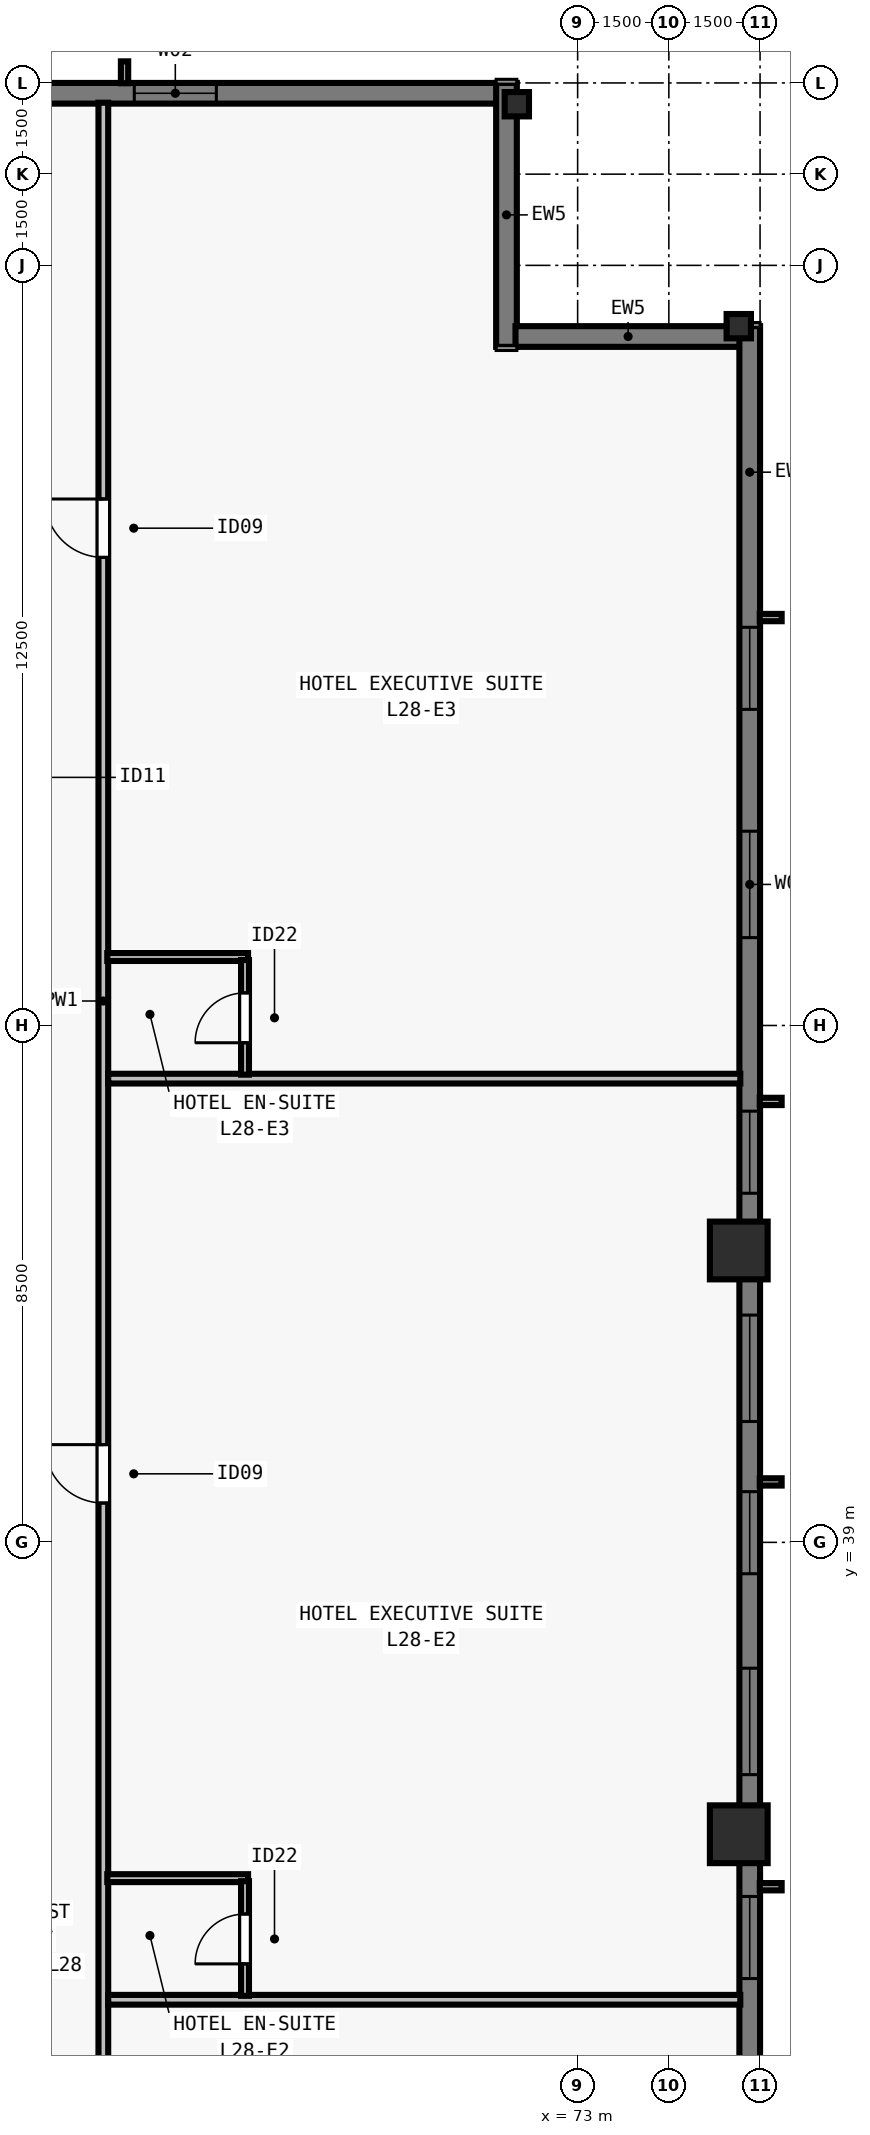
"""IFC4 building model, lengths in metres.
Left out: names, types, materials, properties, quantities, classifications, styles, units other than length and angle.
Written with IfcOpenShell. Run it as: python <this file> out.ifc"""

import sys

from ifc_helpers import new_model, si_unit, direction, frame, frame_2d, origin, origin_2d, place, context, subcontext, project, spatial, rectangle, i_section, extrude, element, fill, save


model = new_model("IFC4")
c1 = context("Model", 3, precision=1e-05, world=origin(), true_north=direction((0.0, 1.0)))
c2 = subcontext(c1, "Body", "Model", "MODEL_VIEW")
j1 = project(units=[si_unit("LENGTHUNIT", "METRE"), si_unit("PLANEANGLEUNIT", "RADIAN")], contexts=[c1])
p1 = place(None, origin())
s1 = spatial("IfcSite", under=j1, at=p1, CompositionType="ELEMENT")
p2 = place(p1, origin())
s2 = spatial("IfcBuilding", under=s1, at=p2, CompositionType="ELEMENT")
p3 = place(p2, frame((0.0, 0.0, 106.0)))
s3 = spatial("IfcBuildingStorey", under=s2, at=p3, CompositionType="ELEMENT", Elevation=106.0)
for number, where, z_axis, x_axis in (
    (1, (75.65, 34.2, 0.0), (0.0, 0.0, 1.0), (0.0, 1.0, 0.0)),
    (2, (75.65, 43.8, 0.0), (0.0, 0.0, 1.0), (0.0, 1.0, 0.0)),
):
    element("IfcColumn", number, at=place(p3, frame(where, z_axis=z_axis, x_axis=x_axis)), inside=s3, PredefinedType="COLUMN", context=c2, shape_type="SweptSolid", body=[
        extrude(rectangle(XDim=0.95, YDim=0.95, at=origin_2d()), origin(), (0.0, 0.0, 1.0), 3.5),
    ])
for number, where, z_axis, x_axis in (
    (3, (75.65, 59.0, 0.0), (0.0, 0.0, 1.0), (0.0, 1.0, 0.0)),
    (4, (72.0, 62.65, 0.0), (0.0, 0.0, 1.0), (1.0, 0.0, 0.0)),
):
    element("IfcColumn", number, at=place(p3, frame(where, z_axis=z_axis, x_axis=x_axis)), inside=s3, PredefinedType="COLUMN", context=c2, shape_type="SweptSolid", body=[
        extrude(i_section(OverallWidth=0.4, OverallDepth=0.4, WebThickness=0.022, FlangeThickness=0.036, at=origin_2d()), origin(), (0.0, 0.0, 1.0), 3.5),
    ])
p4 = place(p3, frame((45.0, 62.83, 0.0), z_axis=(0.0, 0.0, 1.0), x_axis=(1.0, 0.0, 0.0)))
e5 = element("IfcWall", 5, at=p4, inside=s3, PredefinedType="SOLIDWALL", context=c2, shape_type="SweptSolid", body=[
    extrude(rectangle(XDim=26.682, YDim=0.34, at=frame_2d((13.341, 0.0))), origin(), (0.0, 0.0, 1.0), 3.28),
])
p5 = place(p4, frame((5.073, 0.0, 0.8)))
e6 = element("IfcOpeningElement", 6, at=p5, cuts=e5, PredefinedType="OPENING", context=c2, shape_type="SweptSolid", body=[
    extrude(rectangle(XDim=1.35, YDim=1.66, at=frame_2d((0.675, 0.83))), frame((0.0, 0.18, 0.0), z_axis=(0.0, -1.0, 0.0), x_axis=(1.0, 0.0, 0.0)), (0.0, 0.0, 1.0), 0.36),
])
p6 = place(p4, frame((8.219, 0.0, 0.8)))
e7 = element("IfcOpeningElement", 7, at=p6, cuts=e5, PredefinedType="OPENING", context=c2, shape_type="SweptSolid", body=[
    extrude(rectangle(XDim=1.75, YDim=1.66, at=frame_2d((0.875, 0.83))), frame((0.0, 0.18, 0.0), z_axis=(0.0, -1.0, 0.0), x_axis=(1.0, 0.0, 0.0)), (0.0, 0.0, 1.0), 0.36),
])
p7 = place(p4, frame((12.666, 0.0, 0.8)))
e8 = element("IfcOpeningElement", 8, at=p7, cuts=e5, PredefinedType="OPENING", context=c2, shape_type="SweptSolid", body=[
    extrude(rectangle(XDim=1.35, YDim=1.66, at=frame_2d((0.675, 0.83))), frame((0.0, 0.18, 0.0), z_axis=(0.0, -1.0, 0.0), x_axis=(1.0, 0.0, 0.0)), (0.0, 0.0, 1.0), 0.36),
])
p8 = place(p4, frame((15.812, 0.0, 0.8)))
e9 = element("IfcOpeningElement", 9, at=p8, cuts=e5, PredefinedType="OPENING", context=c2, shape_type="SweptSolid", body=[
    extrude(rectangle(XDim=1.75, YDim=1.66, at=frame_2d((0.875, 0.83))), frame((0.0, 0.18, 0.0), z_axis=(0.0, -1.0, 0.0), x_axis=(1.0, 0.0, 0.0)), (0.0, 0.0, 1.0), 0.36),
])
p9 = place(p4, frame((20.709, 0.0, 0.8)))
e10 = element("IfcOpeningElement", 10, at=p9, cuts=e5, PredefinedType="OPENING", context=c2, shape_type="SweptSolid", body=[
    extrude(rectangle(XDim=1.35, YDim=1.66, at=frame_2d((0.675, 0.83))), frame((0.0, 0.18, 0.0), z_axis=(0.0, -1.0, 0.0), x_axis=(1.0, 0.0, 0.0)), (0.0, 0.0, 1.0), 0.36),
])
p10 = place(p3, frame((71.83, 63.0, 0.0), z_axis=(0.0, 0.0, 1.0), x_axis=(0.0, -1.0, 0.0)))
e11 = element("IfcWall", 11, at=p10, inside=s3, PredefinedType="SOLIDWALL", context=c2, shape_type="SweptSolid", body=[
    extrude(rectangle(XDim=4.34, YDim=0.34, at=frame_2d((2.17, 0.0))), origin(), (0.0, 0.0, 1.0), 3.28),
])
p11 = place(p3, frame((71.978, 58.83, 0.0), z_axis=(0.0, 0.0, 1.0), x_axis=(1.0, 0.0, 0.0)))
e12 = element("IfcWall", 12, at=p11, inside=s3, PredefinedType="SOLIDWALL", context=c2, shape_type="SweptSolid", body=[
    extrude(rectangle(XDim=3.704, YDim=0.34, at=frame_2d((1.852, 0.0))), origin(), (0.0, 0.0, 1.0), 3.28),
])
p12 = place(p3, frame((75.83, 59.0, 0.0), z_axis=(0.0, 0.0, 1.0), x_axis=(0.0, -1.0, 0.0)))
e13 = element("IfcWall", 13, at=p12, inside=s3, PredefinedType="SOLIDWALL", context=c2, shape_type="SweptSolid", body=[
    extrude(rectangle(XDim=39.682, YDim=0.34, at=frame_2d((19.841, 0.0))), origin(), (0.0, 0.0, 1.0), 3.28),
])
p13 = place(p12, frame((4.952, 0.0, 0.8)))
e14 = element("IfcOpeningElement", 14, at=p13, cuts=e13, PredefinedType="OPENING", context=c2, shape_type="SweptSolid", body=[
    extrude(rectangle(XDim=1.35, YDim=1.66, at=frame_2d((0.675, 0.83))), frame((0.0, 0.18, 0.0), z_axis=(0.0, -1.0, 0.0), x_axis=(1.0, 0.0, 0.0)), (0.0, 0.0, 1.0), 0.36),
])
p14 = place(p12, frame((8.305, 0.0, 0.8)))
e15 = element("IfcOpeningElement", 15, at=p14, cuts=e13, PredefinedType="OPENING", context=c2, shape_type="SweptSolid", body=[
    extrude(rectangle(XDim=1.75, YDim=1.66, at=frame_2d((0.875, 0.83))), frame((0.0, 0.18, 0.0), z_axis=(0.0, -1.0, 0.0), x_axis=(1.0, 0.0, 0.0)), (0.0, 0.0, 1.0), 0.36),
])
p15 = place(p12, frame((12.909, 0.0, 0.8)))
e16 = element("IfcOpeningElement", 16, at=p15, cuts=e13, PredefinedType="OPENING", context=c2, shape_type="SweptSolid", body=[
    extrude(rectangle(XDim=1.35, YDim=1.66, at=frame_2d((0.675, 0.83))), frame((0.0, 0.18, 0.0), z_axis=(0.0, -1.0, 0.0), x_axis=(1.0, 0.0, 0.0)), (0.0, 0.0, 1.0), 0.36),
])
p16 = place(p12, frame((16.262, 0.0, 0.8)))
e17 = element("IfcOpeningElement", 17, at=p16, cuts=e13, PredefinedType="OPENING", context=c2, shape_type="SweptSolid", body=[
    extrude(rectangle(XDim=1.75, YDim=1.66, at=frame_2d((0.875, 0.83))), frame((0.0, 0.18, 0.0), z_axis=(0.0, -1.0, 0.0), x_axis=(1.0, 0.0, 0.0)), (0.0, 0.0, 1.0), 0.36),
])
p17 = place(p12, frame((19.166, 0.0, 0.8)))
e18 = element("IfcOpeningElement", 18, at=p17, cuts=e13, PredefinedType="OPENING", context=c2, shape_type="SweptSolid", body=[
    extrude(rectangle(XDim=1.35, YDim=1.66, at=frame_2d((0.675, 0.83))), frame((0.0, 0.18, 0.0), z_axis=(0.0, -1.0, 0.0), x_axis=(1.0, 0.0, 0.0)), (0.0, 0.0, 1.0), 0.36),
])
p18 = place(p12, frame((22.07, 0.0, 0.8)))
e19 = element("IfcOpeningElement", 19, at=p18, cuts=e13, PredefinedType="OPENING", context=c2, shape_type="SweptSolid", body=[
    extrude(rectangle(XDim=1.75, YDim=1.66, at=frame_2d((0.875, 0.83))), frame((0.0, 0.18, 0.0), z_axis=(0.0, -1.0, 0.0), x_axis=(1.0, 0.0, 0.0)), (0.0, 0.0, 1.0), 0.36),
])
p19 = place(p12, frame((25.823, 0.0, 0.8)))
e20 = element("IfcOpeningElement", 20, at=p19, cuts=e13, PredefinedType="OPENING", context=c2, shape_type="SweptSolid", body=[
    extrude(rectangle(XDim=1.35, YDim=1.66, at=frame_2d((0.675, 0.83))), frame((0.0, 0.18, 0.0), z_axis=(0.0, -1.0, 0.0), x_axis=(1.0, 0.0, 0.0)), (0.0, 0.0, 1.0), 0.36),
])
p20 = place(p12, frame((29.627, 0.0, 0.8)))
e21 = element("IfcOpeningElement", 21, at=p20, cuts=e13, PredefinedType="OPENING", context=c2, shape_type="SweptSolid", body=[
    extrude(rectangle(XDim=1.75, YDim=1.66, at=frame_2d((0.875, 0.83))), frame((0.0, 0.18, 0.0), z_axis=(0.0, -1.0, 0.0), x_axis=(1.0, 0.0, 0.0)), (0.0, 0.0, 1.0), 0.36),
])
p21 = place(p12, frame((33.38, 0.0, 0.8)))
e22 = element("IfcOpeningElement", 22, at=p21, cuts=e13, PredefinedType="OPENING", context=c2, shape_type="SweptSolid", body=[
    extrude(rectangle(XDim=1.35, YDim=1.66, at=frame_2d((0.675, 0.83))), frame((0.0, 0.18, 0.0), z_axis=(0.0, -1.0, 0.0), x_axis=(1.0, 0.0, 0.0)), (0.0, 0.0, 1.0), 0.36),
])
p22 = place(p3, frame((65.2, 15.325, 0.0), z_axis=(0.0, 0.0, 1.0), x_axis=(0.0, 1.0, 0.0)))
e23 = element("IfcWall", 23, at=p22, inside=s3, PredefinedType="PARTITIONING", context=c2, shape_type="SweptSolid", body=[
    extrude(rectangle(XDim=47.35, YDim=0.16, at=frame_2d((23.675, 0.0))), origin(), (0.0, 0.0, 1.0), 2.555),
])
p23 = place(p22, frame((8.944, 0.0, 0.0)))
e24 = element("IfcOpeningElement", 24, at=p23, cuts=e23, PredefinedType="OPENING", context=c2, shape_type="SweptSolid", body=[
    extrude(rectangle(XDim=0.96, YDim=2.15, at=frame_2d((0.48, 1.075))), frame((0.0, 0.09, 0.0), z_axis=(0.0, -1.0, 0.0), x_axis=(1.0, 0.0, 0.0)), (0.0, 0.0, 1.0), 0.18),
])
p24 = place(p22, frame((24.322, 0.0, 0.0)))
e25 = element("IfcOpeningElement", 25, at=p24, cuts=e23, PredefinedType="OPENING", context=c2, shape_type="SweptSolid", body=[
    extrude(rectangle(XDim=0.96, YDim=2.15, at=frame_2d((0.48, 1.075))), frame((0.0, 0.09, 0.0), z_axis=(0.0, -1.0, 0.0), x_axis=(1.0, 0.0, 0.0)), (0.0, 0.0, 1.0), 0.18),
])
p25 = place(p22, frame((39.873, 0.0, 0.0)))
e26 = element("IfcOpeningElement", 26, at=p25, cuts=e23, PredefinedType="OPENING", context=c2, shape_type="SweptSolid", body=[
    extrude(rectangle(XDim=0.96, YDim=2.15, at=frame_2d((0.48, 1.075))), frame((0.0, 0.09, 0.0), z_axis=(0.0, -1.0, 0.0), x_axis=(1.0, 0.0, 0.0)), (0.0, 0.0, 1.0), 0.18),
])
p26 = place(p3, frame((65.28, 31.478, 0.0), z_axis=(0.0, 0.0, 1.0), x_axis=(1.0, 0.0, 0.0)))
e27 = element("IfcWall", 27, at=p26, inside=s3, PredefinedType="PARTITIONING", context=c2, shape_type="SweptSolid", body=[
    extrude(rectangle(XDim=10.395, YDim=0.16, at=frame_2d((5.198, 0.0))), origin(), (0.0, 0.0, 1.0), 3.28),
])
p27 = place(p3, frame((65.265, 33.478, 0.0), z_axis=(0.0, 0.0, 1.0), x_axis=(1.0, 0.0, 0.0)))
e28 = element("IfcWall", 28, at=p27, inside=s3, PredefinedType="PLUMBINGWALL", context=c2, shape_type="SweptSolid", body=[
    extrude(rectangle(XDim=2.315, YDim=0.13, at=frame_2d((1.158, 0.0))), origin(), (0.0, 0.0, 1.0), 3.28),
])
p28 = place(p3, frame((67.53, 31.543, 0.0), z_axis=(0.0, 0.0, 1.0), x_axis=(0.0, 1.0, 0.0)))
e29 = element("IfcWall", 29, at=p28, inside=s3, PredefinedType="PLUMBINGWALL", context=c2, shape_type="SweptSolid", body=[
    extrude(rectangle(XDim=1.885, YDim=0.13, at=frame_2d((0.942, 0.0))), origin(), (0.0, 0.0, 1.0), 3.28),
])
p29 = place(p28, frame((0.525, 0.0, 0.0)))
e30 = element("IfcOpeningElement", 30, at=p29, cuts=e29, PredefinedType="OPENING", context=c2, shape_type="SweptSolid", body=[
    extrude(rectangle(XDim=0.82, YDim=2.1, at=frame_2d((0.41, 1.05))), frame((0.0, 0.075, 0.0), z_axis=(0.0, -1.0, 0.0), x_axis=(1.0, 0.0, 0.0)), (0.0, 0.0, 1.0), 0.15),
])
p30 = place(p3, frame((65.28, 46.626, 0.0), z_axis=(0.0, 0.0, 1.0), x_axis=(1.0, 0.0, 0.0)))
e31 = element("IfcWall", 31, at=p30, inside=s3, PredefinedType="PARTITIONING", context=c2, shape_type="SweptSolid", body=[
    extrude(rectangle(XDim=10.395, YDim=0.16, at=frame_2d((5.198, 0.0))), origin(), (0.0, 0.0, 1.0), 3.28),
])
p31 = place(p3, frame((65.265, 48.626, 0.0), z_axis=(0.0, 0.0, 1.0), x_axis=(1.0, 0.0, 0.0)))
e32 = element("IfcWall", 32, at=p31, inside=s3, PredefinedType="PLUMBINGWALL", context=c2, shape_type="SweptSolid", body=[
    extrude(rectangle(XDim=2.315, YDim=0.13, at=frame_2d((1.158, 0.0))), origin(), (0.0, 0.0, 1.0), 3.28),
])
p32 = place(p3, frame((67.53, 46.691, 0.0), z_axis=(0.0, 0.0, 1.0), x_axis=(0.0, 1.0, 0.0)))
e33 = element("IfcWall", 33, at=p32, inside=s3, PredefinedType="PLUMBINGWALL", context=c2, shape_type="SweptSolid", body=[
    extrude(rectangle(XDim=1.885, YDim=0.13, at=frame_2d((0.942, 0.0))), origin(), (0.0, 0.0, 1.0), 3.28),
])
p33 = place(p32, frame((0.525, 0.0, 0.0)))
e34 = element("IfcOpeningElement", 34, at=p33, cuts=e33, PredefinedType="OPENING", context=c2, shape_type="SweptSolid", body=[
    extrude(rectangle(XDim=0.82, YDim=2.1, at=frame_2d((0.41, 1.05))), frame((0.0, 0.075, 0.0), z_axis=(0.0, -1.0, 0.0), x_axis=(1.0, 0.0, 0.0)), (0.0, 0.0, 1.0), 0.15),
])
p34 = place(p9, origin())
e35 = element("IfcWindow", 35, at=p34, inside=s3, PartitioningType="SINGLE_PANEL", PredefinedType="WINDOW", context=c2, shape_type="SweptSolid", body=[
    extrude(rectangle(XDim=1.35, YDim=1.66, at=frame_2d((0.675, 0.83))), frame((0.0, -0.05, 0.0), z_axis=(0.0, -1.0, 0.0), x_axis=(1.0, 0.0, 0.0)), (0.0, 0.0, 1.0), 0.06),
])
fill(e10, e35)
p35 = place(p13, origin())
e36 = element("IfcWindow", 36, at=p35, inside=s3, PartitioningType="SINGLE_PANEL", PredefinedType="WINDOW", context=c2, shape_type="SweptSolid", body=[
    extrude(rectangle(XDim=1.35, YDim=1.66, at=frame_2d((0.675, 0.83))), frame((0.0, -0.05, 0.0), z_axis=(0.0, -1.0, 0.0), x_axis=(1.0, 0.0, 0.0)), (0.0, 0.0, 1.0), 0.06),
])
fill(e14, e36)
p36 = place(p14, origin())
e37 = element("IfcWindow", 37, at=p36, inside=s3, PartitioningType="SINGLE_PANEL", PredefinedType="WINDOW", context=c2, shape_type="SweptSolid", body=[
    extrude(rectangle(XDim=1.75, YDim=1.66, at=frame_2d((0.875, 0.83))), frame((0.0, -0.05, 0.0), z_axis=(0.0, -1.0, 0.0), x_axis=(1.0, 0.0, 0.0)), (0.0, 0.0, 1.0), 0.06),
])
fill(e15, e37)
p37 = place(p15, origin())
e38 = element("IfcWindow", 38, at=p37, inside=s3, PartitioningType="SINGLE_PANEL", PredefinedType="WINDOW", context=c2, shape_type="SweptSolid", body=[
    extrude(rectangle(XDim=1.35, YDim=1.66, at=frame_2d((0.675, 0.83))), frame((0.0, -0.05, 0.0), z_axis=(0.0, -1.0, 0.0), x_axis=(1.0, 0.0, 0.0)), (0.0, 0.0, 1.0), 0.06),
])
fill(e16, e38)
p38 = place(p16, origin())
e39 = element("IfcWindow", 39, at=p38, inside=s3, PartitioningType="SINGLE_PANEL", PredefinedType="WINDOW", context=c2, shape_type="SweptSolid", body=[
    extrude(rectangle(XDim=1.75, YDim=1.66, at=frame_2d((0.875, 0.83))), frame((0.0, -0.05, 0.0), z_axis=(0.0, -1.0, 0.0), x_axis=(1.0, 0.0, 0.0)), (0.0, 0.0, 1.0), 0.06),
])
fill(e17, e39)
p39 = place(p17, origin())
e40 = element("IfcWindow", 40, at=p39, inside=s3, PartitioningType="SINGLE_PANEL", PredefinedType="WINDOW", context=c2, shape_type="SweptSolid", body=[
    extrude(rectangle(XDim=1.35, YDim=1.66, at=frame_2d((0.675, 0.83))), frame((0.0, -0.05, 0.0), z_axis=(0.0, -1.0, 0.0), x_axis=(1.0, 0.0, 0.0)), (0.0, 0.0, 1.0), 0.06),
])
fill(e18, e40)
p40 = place(p18, origin())
e41 = element("IfcWindow", 41, at=p40, inside=s3, PartitioningType="SINGLE_PANEL", PredefinedType="WINDOW", context=c2, shape_type="SweptSolid", body=[
    extrude(rectangle(XDim=1.75, YDim=1.66, at=frame_2d((0.875, 0.83))), frame((0.0, -0.05, 0.0), z_axis=(0.0, -1.0, 0.0), x_axis=(1.0, 0.0, 0.0)), (0.0, 0.0, 1.0), 0.06),
])
fill(e19, e41)
p41 = place(p19, origin())
e42 = element("IfcWindow", 42, at=p41, inside=s3, PartitioningType="SINGLE_PANEL", PredefinedType="WINDOW", context=c2, shape_type="SweptSolid", body=[
    extrude(rectangle(XDim=1.35, YDim=1.66, at=frame_2d((0.675, 0.83))), frame((0.0, -0.05, 0.0), z_axis=(0.0, -1.0, 0.0), x_axis=(1.0, 0.0, 0.0)), (0.0, 0.0, 1.0), 0.06),
])
fill(e20, e42)
p42 = place(p29, origin())
e43 = element("IfcDoor", 43, at=p42, inside=s3, OperationType="SINGLE_SWING_LEFT", PredefinedType="DOOR", context=c2, shape_type="SweptSolid", body=[
    extrude(rectangle(XDim=0.82, YDim=2.1, at=frame_2d((0.41, 1.05))), frame((0.0, 0.025, 0.0), z_axis=(0.0, -1.0, 0.0), x_axis=(1.0, 0.0, 0.0)), (0.0, 0.0, 1.0), 0.05),
])
fill(e30, e43)
p43 = place(p24, origin())
e44 = element("IfcDoor", 44, at=p43, inside=s3, OperationType="SINGLE_SWING_RIGHT", PredefinedType="DOOR", context=c2, shape_type="SweptSolid", body=[
    extrude(rectangle(XDim=0.96, YDim=2.15, at=frame_2d((0.48, 1.075))), frame((0.0, 0.025, 0.0), z_axis=(0.0, -1.0, 0.0), x_axis=(1.0, 0.0, 0.0)), (0.0, 0.0, 1.0), 0.05),
])
fill(e25, e44)
p44 = place(p33, origin())
e45 = element("IfcDoor", 45, at=p44, inside=s3, OperationType="SINGLE_SWING_LEFT", PredefinedType="DOOR", context=c2, shape_type="SweptSolid", body=[
    extrude(rectangle(XDim=0.82, YDim=2.1, at=frame_2d((0.41, 1.05))), frame((0.0, 0.025, 0.0), z_axis=(0.0, -1.0, 0.0), x_axis=(1.0, 0.0, 0.0)), (0.0, 0.0, 1.0), 0.05),
])
fill(e34, e45)
p45 = place(p25, origin())
e46 = element("IfcDoor", 46, at=p45, inside=s3, OperationType="SINGLE_SWING_RIGHT", PredefinedType="DOOR", context=c2, shape_type="SweptSolid", body=[
    extrude(rectangle(XDim=0.96, YDim=2.15, at=frame_2d((0.48, 1.075))), frame((0.0, 0.025, 0.0), z_axis=(0.0, -1.0, 0.0), x_axis=(1.0, 0.0, 0.0)), (0.0, 0.0, 1.0), 0.05),
])
fill(e26, e46)
save(model, sys.argv[1])
